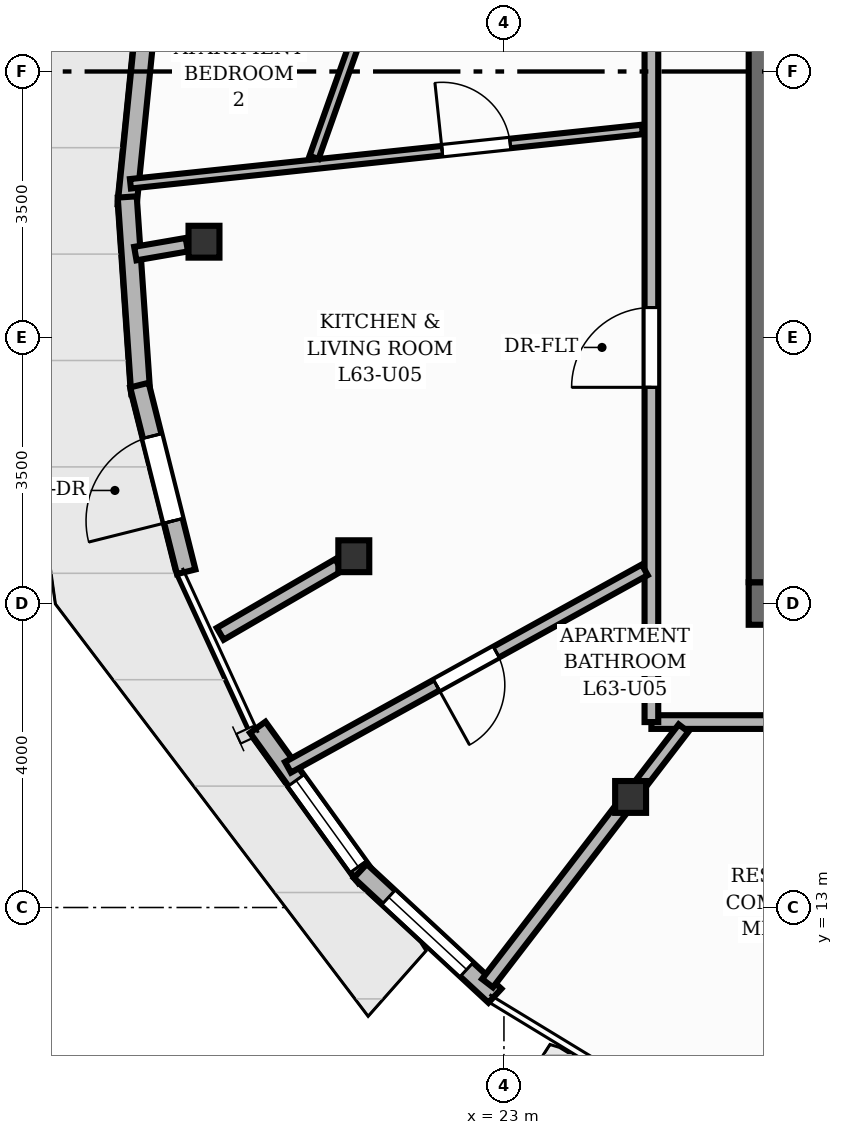
"""IFC4 building model, lengths in metres.
Left out: names, types, materials, properties, quantities, classifications, styles, units other than length and angle.
Written with IfcOpenShell. Run it as: python <this file> out.ifc"""

import sys

from ifc_helpers import new_model, si_unit, direction, frame, frame_2d, origin, origin_2d, place, context, subcontext, project, spatial, rectangle, i_section, extrude, element, fill, save


model = new_model("IFC4")
c1 = context("Model", 3, precision=1e-05, world=origin(), true_north=direction((0.0, 1.0)))
c2 = subcontext(c1, "Body", "Model", "MODEL_VIEW")
j1 = project(units=[si_unit("LENGTHUNIT", "METRE"), si_unit("PLANEANGLEUNIT", "RADIAN")], contexts=[c1])
p1 = place(None, origin())
s1 = spatial("IfcSite", under=j1, at=p1, CompositionType="ELEMENT")
p2 = place(p1, origin())
s2 = spatial("IfcBuilding", under=s1, at=p2, CompositionType="ELEMENT")
p3 = place(p2, frame((0.0, 0.0, 211.04)))
s3 = spatial("IfcBuildingStorey", under=s2, at=p3, CompositionType="ELEMENT", Elevation=211.04)
p4 = place(p3, frame((26.22, 17.0, 0.0), z_axis=(0.0, 0.0, 1.0), x_axis=(1.0, 0.0, 0.0)))
e1 = element("IfcWall", 1, at=p4, inside=s3, PredefinedType="SHEAR", context=c2, shape_type="SweptSolid", body=[
    extrude(rectangle(XDim=11.56, YDim=0.56, at=frame_2d((5.78, 0.0))), origin(), (0.0, 0.0, 1.0), 3.2),
])
p5 = place(p4, frame((2.28, 0.0, 0.0)))
e2 = element("IfcOpeningElement", 2, at=p5, cuts=e1, PredefinedType="OPENING", context=c2, shape_type="SweptSolid", body=[
    extrude(rectangle(XDim=1.1, YDim=2.15, at=frame_2d((0.55, 1.075))), frame((0.0, 0.29, 0.0), z_axis=(0.0, -1.0, 0.0), x_axis=(1.0, 0.0, 0.0)), (0.0, 0.0, 1.0), 0.58),
])
p6 = place(p4, frame((5.83, 0.0, 0.0)))
e3 = element("IfcOpeningElement", 3, at=p6, cuts=e1, PredefinedType="OPENING", context=c2, shape_type="SweptSolid", body=[
    extrude(rectangle(XDim=0.9, YDim=2.1, at=frame_2d((0.45, 1.05))), frame((0.0, 0.29, 0.0), z_axis=(0.0, -1.0, 0.0), x_axis=(1.0, 0.0, 0.0)), (0.0, 0.0, 1.0), 0.58),
])
p7 = place(p3, frame((26.5, 17.28, 0.0), z_axis=(0.0, 0.0, 1.0), x_axis=(0.0, 1.0, 0.0)))
e4 = element("IfcWall", 4, at=p7, inside=s3, PredefinedType="SHEAR", context=c2, shape_type="SweptSolid", body=[
    extrude(rectangle(XDim=13.44, YDim=0.56, at=frame_2d((6.72, 0.0))), origin(), (0.0, 0.0, 1.0), 3.2),
])
for number, where, z_axis, x_axis in (
    (5, (19.054, 21.76, 0.0), (0.0, 0.0, 1.0), (1.0, 0.0, 0.0)),
    (6, (21.025, 17.622, 0.0), (0.0, 0.0, 1.0), (1.0, 0.0, 0.0)),
    (7, (24.667, 14.455, 0.0), (0.0, 0.0, 1.0), (1.0, 0.0, 0.0)),
):
    element("IfcColumn", number, at=place(p3, frame(where, z_axis=z_axis, x_axis=x_axis)), inside=s3, PredefinedType="COLUMN", context=c2, shape_type="SweptSolid", body=[
        extrude(i_section(OverallWidth=0.407, OverallDepth=0.419, WebThickness=0.031, FlangeThickness=0.049, at=origin_2d()), origin(), (0.0, 0.0, 1.0), 3.2),
    ])
p8 = place(p3, frame((18.042, 22.239, 0.0), z_axis=(0.0, 0.0, 1.0), x_axis=(0.100196668354, 0.99496765156, 0.0)))
e8 = element("IfcWall", 8, at=p8, inside=s3, PredefinedType="SOLIDWALL", context=c2, shape_type="SweptSolid", body=[
    extrude(rectangle(XDim=2.651, YDim=0.25, at=frame_2d((1.326, 0.0))), origin(), (0.0, 0.0, 1.0), 2.96),
])
p9 = place(p3, frame((18.221, 19.763, 0.0), z_axis=(0.0, 0.0, 1.0), x_axis=(-0.068469168344, 0.997653232835, 0.0)))
e9 = element("IfcWall", 9, at=p9, inside=s3, PredefinedType="SOLIDWALL", context=c2, shape_type="SweptSolid", body=[
    extrude(rectangle(XDim=2.592, YDim=0.25, at=frame_2d((1.296, 0.0))), origin(), (0.0, 0.0, 1.0), 2.96),
])
p10 = place(p3, frame((18.82, 17.417, 0.0), z_axis=(0.0, 0.0, 1.0), x_axis=(-0.243170809566, 0.969983483042, 0.0)))
e10 = element("IfcWall", 10, at=p10, inside=s3, PredefinedType="SOLIDWALL", context=c2, shape_type="SweptSolid", body=[
    extrude(rectangle(XDim=2.532, YDim=0.25, at=frame_2d((1.266, 0.0))), origin(), (0.0, 0.0, 1.0), 2.96),
])
p11 = place(p10, frame((0.691, 0.0, 0.0)))
e11 = element("IfcOpeningElement", 11, at=p11, cuts=e10, PredefinedType="OPENING", context=c2, shape_type="SweptSolid", body=[
    extrude(rectangle(XDim=1.15, YDim=2.2, at=frame_2d((0.575, 1.1))), frame((0.0, 0.135, 0.0), z_axis=(0.0, -1.0, 0.0), x_axis=(1.0, 0.0, 0.0)), (0.0, 0.0, 1.0), 0.27),
])
p12 = place(p3, frame((21.186, 13.395, 0.0), z_axis=(0.0, 0.0, 1.0), x_axis=(-0.584824573101, 0.811159798497, 0.0)))
e12 = element("IfcWall", 12, at=p12, inside=s3, PredefinedType="SOLIDWALL", context=c2, shape_type="SweptSolid", body=[
    extrude(rectangle(XDim=2.437, YDim=0.25, at=frame_2d((1.218, 0.0))), origin(), (0.0, 0.0, 1.0), 2.96),
])
p13 = place(p12, frame((0.175, 0.0, 0.85)))
e13 = element("IfcOpeningElement", 13, at=p13, cuts=e12, PredefinedType="OPENING", context=c2, shape_type="SweptSolid", body=[
    extrude(rectangle(XDim=1.4, YDim=1.55, at=frame_2d((0.7, 0.775))), frame((0.0, 0.135, 0.0), z_axis=(0.0, -1.0, 0.0), x_axis=(1.0, 0.0, 0.0)), (0.0, 0.0, 1.0), 0.27),
])
p14 = place(p3, frame((22.881, 11.839, 0.0), z_axis=(0.0, 0.0, 1.0), x_axis=(-0.733441361842, 0.679752726173, 0.0)))
e14 = element("IfcWall", 14, at=p14, inside=s3, PredefinedType="SOLIDWALL", context=c2, shape_type="SweptSolid", body=[
    extrude(rectangle(XDim=2.415, YDim=0.25, at=frame_2d((1.207, 0.0))), origin(), (0.0, 0.0, 1.0), 2.96),
])
p15 = place(p14, frame((0.507, 0.0, 0.85)))
e15 = element("IfcOpeningElement", 15, at=p15, cuts=e14, PredefinedType="OPENING", context=c2, shape_type="SweptSolid", body=[
    extrude(rectangle(XDim=1.4, YDim=1.55, at=frame_2d((0.7, 0.775))), frame((0.0, 0.135, 0.0), z_axis=(0.0, -1.0, 0.0), x_axis=(1.0, 0.0, 0.0)), (0.0, 0.0, 1.0), 0.27),
])
p16 = place(p3, frame((18.827, 21.721, 0.0), z_axis=(0.0, 0.0, 1.0), x_axis=(-0.985357392461, -0.170501639647, 0.0)))
e16 = element("IfcWall", 16, at=p16, inside=s3, PredefinedType="PARTITIONING", context=c2, shape_type="SweptSolid", body=[
    extrude(rectangle(XDim=0.687, YDim=0.18, at=frame_2d((0.344, 0.0))), origin(), (0.0, 0.0, 1.0), 2.403),
])
p17 = place(p3, frame((20.826, 17.507, 0.0), z_axis=(0.0, 0.0, 1.0), x_axis=(-0.864637155841, -0.502396843879, 0.0)))
e17 = element("IfcWall", 17, at=p17, inside=s3, PredefinedType="PARTITIONING", context=c2, shape_type="SweptSolid", body=[
    extrude(rectangle(XDim=1.803, YDim=0.18, at=frame_2d((0.901, 0.0))), origin(), (0.0, 0.0, 1.0), 2.403),
])
p18 = place(p3, frame((24.527, 14.273, 0.0), z_axis=(0.0, 0.0, 1.0), x_axis=(-0.609244614772, -0.792982344931, 0.0)))
e18 = element("IfcWall", 18, at=p18, inside=s3, PredefinedType="PARTITIONING", context=c2, shape_type="SweptSolid", body=[
    extrude(rectangle(XDim=2.861, YDim=0.18, at=frame_2d((1.43, 0.0))), origin(), (0.0, 0.0, 1.0), 2.403),
])
p19 = place(p3, frame((30.74, 15.44, 0.0), z_axis=(0.0, 0.0, 1.0), x_axis=(-1.0, 0.0, 0.0)))
e19 = element("IfcWall", 19, at=p19, inside=s3, PredefinedType="PARTITIONING", context=c2, shape_type="SweptSolid", body=[
    extrude(rectangle(XDim=5.8, YDim=0.18, at=frame_2d((2.9, 0.0))), origin(), (0.0, 0.0, 1.0), 2.955),
])
p20 = place(p19, frame((2.221, 0.0, 0.0)))
e20 = element("IfcOpeningElement", 20, at=p20, cuts=e19, PredefinedType="OPENING", context=c2, shape_type="SweptSolid", body=[
    extrude(rectangle(XDim=0.9, YDim=2.1, at=frame_2d((0.45, 1.05))), frame((0.0, 0.1, 0.0), z_axis=(0.0, -1.0, 0.0), x_axis=(1.0, 0.0, 0.0)), (0.0, 0.0, 1.0), 0.2),
])
p21 = place(p3, frame((24.94, 15.44, 0.0), z_axis=(0.0, 0.0, 1.0), x_axis=(0.0, 1.0, 0.0)))
e21 = element("IfcWall", 21, at=p21, inside=s3, PredefinedType="PARTITIONING", context=c2, shape_type="SweptSolid", body=[
    extrude(rectangle(XDim=17.12, YDim=0.18, at=frame_2d((8.56, 0.0))), origin(), (0.0, 0.0, 1.0), 2.955),
])
p22 = place(p21, frame((4.404, 0.0, 0.0)))
e22 = element("IfcOpeningElement", 22, at=p22, cuts=e21, PredefinedType="OPENING", context=c2, shape_type="SweptSolid", body=[
    extrude(rectangle(XDim=1.05, YDim=2.15, at=frame_2d((0.525, 1.075))), frame((0.0, 0.1, 0.0), z_axis=(0.0, -1.0, 0.0), x_axis=(1.0, 0.0, 0.0)), (0.0, 0.0, 1.0), 0.2),
])
p23 = place(p3, frame((24.806, 14.636, 0.0), z_axis=(0.0, 0.0, 1.0), x_axis=(0.609284308489, 0.792951846854, 0.0)))
e23 = element("IfcWall", 23, at=p23, inside=s3, PredefinedType="PLUMBINGWALL", context=c2, shape_type="SweptSolid", body=[
    extrude(rectangle(XDim=0.913, YDim=0.16, at=frame_2d((0.457, 0.0))), origin(), (0.0, 0.0, 1.0), 2.403),
])
p24 = place(p3, frame((24.853, 17.443, 0.0), z_axis=(0.0, 0.0, 1.0), x_axis=(-0.874969642777, -0.484177781624, 0.0)))
e24 = element("IfcWall", 24, at=p24, inside=s3, PredefinedType="PLUMBINGWALL", context=c2, shape_type="SweptSolid", body=[
    extrude(rectangle(XDim=5.365, YDim=0.16, at=frame_2d((2.682, 0.0))), origin(), (0.0, 0.0, 1.0), 2.955),
])
p25 = place(p24, frame((2.232, 0.0, 0.0)))
e25 = element("IfcOpeningElement", 25, at=p25, cuts=e24, PredefinedType="OPENING", context=c2, shape_type="SweptSolid", body=[
    extrude(rectangle(XDim=0.9, YDim=2.1, at=frame_2d((0.45, 1.05))), frame((0.0, 0.09, 0.0), z_axis=(0.0, -1.0, 0.0), x_axis=(1.0, 0.0, 0.0)), (0.0, 0.0, 1.0), 0.18),
])
p26 = place(p3, frame((18.086, 22.522, 0.0), z_axis=(0.0, 0.0, 1.0), x_axis=(0.994410835851, 0.105579778091, 0.0)))
e26 = element("IfcWall", 26, at=p26, inside=s3, PredefinedType="PARTITIONING", context=c2, shape_type="SweptSolid", body=[
    extrude(rectangle(XDim=6.773, YDim=0.125, at=frame_2d((3.386, 0.0))), origin(), (0.0, 0.0, 1.0), 2.955),
])
p27 = place(p26, frame((4.124, 0.0, 0.0)))
e27 = element("IfcOpeningElement", 27, at=p27, cuts=e26, PredefinedType="OPENING", context=c2, shape_type="SweptSolid", body=[
    extrude(rectangle(XDim=0.9, YDim=2.1, at=frame_2d((0.45, 1.05))), frame((0.0, 0.073, 0.0), z_axis=(0.0, -1.0, 0.0), x_axis=(1.0, 0.0, 0.0)), (0.0, 0.0, 1.0), 0.145),
])
p28 = place(p3, frame((20.501, 22.87, 0.0), z_axis=(0.0, 0.0, 1.0), x_axis=(0.334686593727, 0.942329498625, 0.0)))
e28 = element("IfcWall", 28, at=p28, inside=s3, PredefinedType="PARTITIONING", context=c2, shape_type="SweptSolid", body=[
    extrude(rectangle(XDim=11.525, YDim=0.125, at=frame_2d((5.762, 0.0))), origin(), (0.0, 0.0, 1.0), 2.488),
])
p29 = place(p28, frame((5.312, 0.0, 0.0)))
e29 = element("IfcOpeningElement", 29, at=p29, cuts=e28, PredefinedType="OPENING", context=c2, shape_type="SweptSolid", body=[
    extrude(rectangle(XDim=0.9, YDim=2.1, at=frame_2d((0.45, 1.05))), frame((0.0, 0.073, 0.0), z_axis=(0.0, -1.0, 0.0), x_axis=(1.0, 0.0, 0.0)), (0.0, 0.0, 1.0), 0.145),
])
p30 = place(p11, origin())
e30 = element("IfcDoor", 30, at=p30, inside=s3, OperationType="SINGLE_SWING_LEFT", PredefinedType="DOOR", context=c2, shape_type="SweptSolid", body=[
    extrude(rectangle(XDim=1.15, YDim=2.2, at=frame_2d((0.575, 1.1))), frame((0.0, 0.025, 0.0), z_axis=(0.0, -1.0, 0.0), x_axis=(1.0, 0.0, 0.0)), (0.0, 0.0, 1.0), 0.05),
])
fill(e11, e30)
p31 = place(p13, origin())
e31 = element("IfcWindow", 31, at=p31, inside=s3, PartitioningType="SINGLE_PANEL", PredefinedType="WINDOW", context=c2, shape_type="SweptSolid", body=[
    extrude(rectangle(XDim=1.4, YDim=1.55, at=frame_2d((0.7, 0.775))), frame((0.0, 0.03, 0.0), z_axis=(0.0, -1.0, 0.0), x_axis=(1.0, 0.0, 0.0)), (0.0, 0.0, 1.0), 0.06),
])
fill(e13, e31)
p32 = place(p15, origin())
e32 = element("IfcWindow", 32, at=p32, inside=s3, PartitioningType="SINGLE_PANEL", PredefinedType="WINDOW", context=c2, shape_type="SweptSolid", body=[
    extrude(rectangle(XDim=1.4, YDim=1.55, at=frame_2d((0.7, 0.775))), frame((0.0, 0.03, 0.0), z_axis=(0.0, -1.0, 0.0), x_axis=(1.0, 0.0, 0.0)), (0.0, 0.0, 1.0), 0.06),
])
fill(e15, e32)
p33 = place(p22, origin())
e33 = element("IfcDoor", 33, at=p33, inside=s3, OperationType="SINGLE_SWING_LEFT", PredefinedType="DOOR", context=c2, shape_type="SweptSolid", body=[
    extrude(rectangle(XDim=1.05, YDim=2.15, at=frame_2d((0.525, 1.075))), frame((0.0, 0.025, 0.0), z_axis=(0.0, -1.0, 0.0), x_axis=(1.0, 0.0, 0.0)), (0.0, 0.0, 1.0), 0.05),
])
fill(e22, e33)
p34 = place(p25, origin())
e34 = element("IfcDoor", 34, at=p34, inside=s3, OperationType="SINGLE_SWING_RIGHT", PredefinedType="DOOR", context=c2, shape_type="SweptSolid", body=[
    extrude(rectangle(XDim=0.9, YDim=2.1, at=frame_2d((0.45, 1.05))), frame((0.0, 0.025, 0.0), z_axis=(0.0, -1.0, 0.0), x_axis=(1.0, 0.0, 0.0)), (0.0, 0.0, 1.0), 0.05),
])
fill(e25, e34)
p35 = place(p27, origin())
e35 = element("IfcDoor", 35, at=p35, inside=s3, OperationType="SINGLE_SWING_LEFT", PredefinedType="DOOR", context=c2, shape_type="SweptSolid", body=[
    extrude(rectangle(XDim=0.9, YDim=2.1, at=frame_2d((0.45, 1.05))), frame((0.0, 0.025, 0.0), z_axis=(0.0, -1.0, 0.0), x_axis=(1.0, 0.0, 0.0)), (0.0, 0.0, 1.0), 0.05),
])
fill(e27, e35)
save(model, sys.argv[1])
